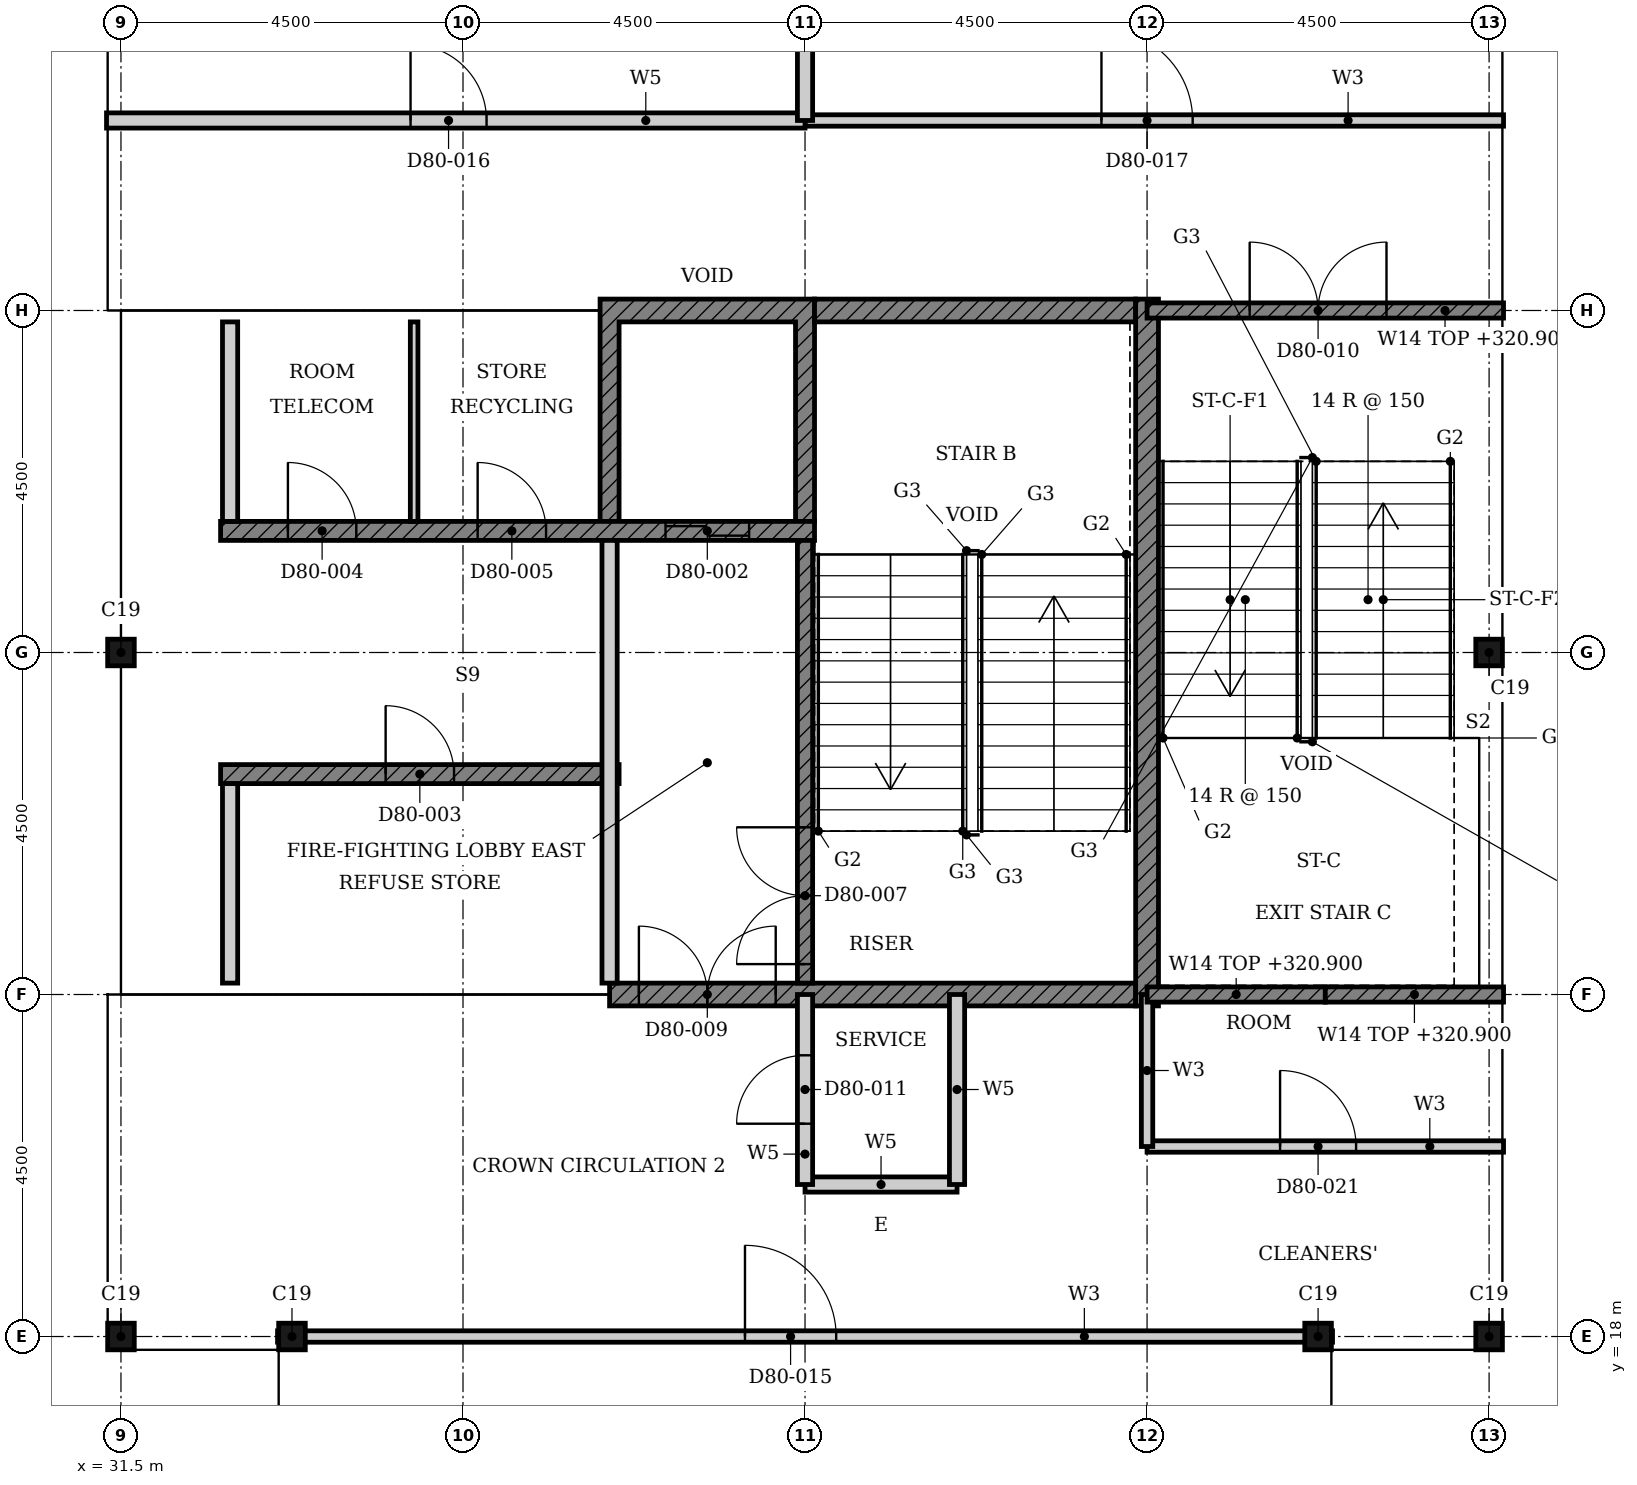
"""IFC4 building model, lengths in metres.
Left out: names, types, materials, properties, quantities, classifications, styles, units other than length and angle.
Written with IfcOpenShell. Run it as: python <this file> out.ifc"""

import sys

from ifc_helpers import new_model, si_unit, direction, frame, frame_2d, origin, origin_2d, place, context, subcontext, project, spatial, polyline, rectangle, i_section, outline, extrude, element, fill, save


model = new_model("IFC4")
c1 = context("Model", 3, precision=1e-05, world=origin(), true_north=direction((0.0, 1.0)))
c2 = subcontext(c1, "Body", "Model", "MODEL_VIEW")
j1 = project(units=[si_unit("LENGTHUNIT", "METRE"), si_unit("PLANEANGLEUNIT", "RADIAN")], contexts=[c1])
p1 = place(None, origin())
s1 = spatial("IfcSite", under=j1, at=p1, CompositionType="ELEMENT")
p2 = place(p1, origin())
s2 = spatial("IfcBuilding", under=s1, at=p2, CompositionType="ELEMENT")
p3 = place(p2, frame((0.0, 0.0, 317.0)))
s3 = spatial("IfcBuildingStorey", under=s2, at=p3, CompositionType="ELEMENT", Elevation=317.0)
for number, where, z_axis, x_axis in (
    (1, (47.25, 18.0, 0.0), (0.0, 0.0, 1.0), (1.0, 0.0, 0.0)),
    (2, (49.5, 18.0, 0.0), (0.0, 0.0, 1.0), (1.0, 0.0, 0.0)),
    (3, (49.5, 27.0, 0.0), (0.0, 0.0, 1.0), (1.0, 0.0, 0.0)),
    (4, (31.5, 27.0, 0.0), (0.0, 0.0, 1.0), (1.0, 0.0, 0.0)),
    (5, (31.5, 18.0, 0.0), (0.0, 0.0, 1.0), (1.0, 0.0, 0.0)),
    (6, (33.75, 18.0, 0.0), (0.0, 0.0, 1.0), (1.0, 0.0, 0.0)),
):
    element("IfcColumn", number, at=place(p3, frame(where, z_axis=z_axis, x_axis=x_axis)), inside=s3, PredefinedType="COLUMN", context=c2, shape_type="SweptSolid", body=[
        extrude(i_section(OverallWidth=0.35, OverallDepth=0.35, WebThickness=0.012, FlangeThickness=0.019, FilletRadius=0.013, at=origin_2d()), origin(), (0.0, 0.0, 1.0), 4.2),
    ])
p4 = place(p3, origin())
e7 = element("IfcWall", 7, at=p4, inside=s3, PredefinedType="SHEAR", context=c2, shape_type="SweptSolid", body=[
    extrude(outline(polyline([(37.803, 28.725), (38.053, 28.725), (38.053, 31.35), (40.375, 31.35), (40.375, 28.725), (40.625, 28.725), (40.625, 31.65), (37.803, 31.65), (37.803, 28.725)])), origin(), (0.0, 0.0, 1.0), 3.9),
])
p5 = place(p3, frame((37.928, 22.5, 0.0), z_axis=(0.0, 0.0, 1.0), x_axis=(1.0, 0.0, 0.0)))
e8 = element("IfcWall", 8, at=p5, inside=s3, PredefinedType="SHEAR", context=c2, shape_type="SweptSolid", body=[
    extrude(rectangle(XDim=6.922, YDim=0.3, at=frame_2d((3.461, 0.0))), origin(), (0.0, 0.0, 1.0), 3.1),
])
p6 = place(p5, frame((0.386, 0.0, 0.0)))
e9 = element("IfcOpeningElement", 9, at=p6, cuts=e8, PredefinedType="OPENING", context=c2, shape_type="SweptSolid", body=[
    extrude(rectangle(XDim=1.8, YDim=2.1, at=frame_2d((0.9, 1.05))), frame((0.0, 0.16, 0.0), z_axis=(0.0, -1.0, 0.0), x_axis=(1.0, 0.0, 0.0)), (0.0, 0.0, 1.0), 0.32),
])
p7 = place(p3, frame((40.625, 31.5, 0.0), z_axis=(0.0, 0.0, 1.0), x_axis=(1.0, 0.0, 0.0)))
e10 = element("IfcWall", 10, at=p7, inside=s3, PredefinedType="SHEAR", context=c2, shape_type="SweptSolid", body=[
    extrude(rectangle(XDim=4.225, YDim=0.3, at=frame_2d((2.113, 0.0))), origin(), (0.0, 0.0, 1.0), 3.1),
])
p8 = place(p3, frame((45.0, 22.35, 0.0), z_axis=(0.0, 0.0, 1.0), x_axis=(0.0, 1.0, 0.0)))
e11 = element("IfcWall", 11, at=p8, inside=s3, PredefinedType="SHEAR", context=c2, shape_type="SweptSolid", body=[
    extrude(rectangle(XDim=9.3, YDim=0.3, at=frame_2d((4.65, 0.0))), origin(), (0.0, 0.0, 1.0), 3.9),
])
p9 = place(p3, frame((32.811, 25.4, 0.0), z_axis=(0.0, 0.0, 1.0), x_axis=(1.0, 0.0, 0.0)))
e12 = element("IfcWall", 12, at=p9, inside=s3, PredefinedType="SHEAR", context=c2, shape_type="SweptSolid", body=[
    extrude(rectangle(XDim=5.243, YDim=0.25, at=frame_2d((2.621, 0.0))), origin(), (0.0, 0.0, 1.0), 3.9),
])
p10 = place(p9, frame((2.171, 0.0, 0.0)))
e13 = element("IfcOpeningElement", 13, at=p10, cuts=e12, PredefinedType="OPENING", context=c2, shape_type="SweptSolid", body=[
    extrude(rectangle(XDim=0.9, YDim=2.1, at=frame_2d((0.45, 1.05))), frame((0.0, 0.135, 0.0), z_axis=(0.0, -1.0, 0.0), x_axis=(1.0, 0.0, 0.0)), (0.0, 0.0, 1.0), 0.27),
])
p11 = place(p3, frame((32.811, 28.6, 0.0), z_axis=(0.0, 0.0, 1.0), x_axis=(1.0, 0.0, 0.0)))
e14 = element("IfcWall", 14, at=p11, inside=s3, PredefinedType="SHEAR", context=c2, shape_type="SweptSolid", body=[
    extrude(rectangle(XDim=7.814, YDim=0.25, at=frame_2d((3.907, 0.0))), origin(), (0.0, 0.0, 1.0), 3.9),
])
p12 = place(p11, frame((5.854, 0.0, 0.0)))
e15 = element("IfcOpeningElement", 15, at=p12, cuts=e14, PredefinedType="OPENING", context=c2, shape_type="SweptSolid", body=[
    extrude(rectangle(XDim=1.1, YDim=2.1, at=frame_2d((0.55, 1.05))), frame((0.0, 0.135, 0.0), z_axis=(0.0, -1.0, 0.0), x_axis=(1.0, 0.0, 0.0)), (0.0, 0.0, 1.0), 0.27),
])
p13 = place(p11, frame((0.886, 0.0, 0.0)))
e16 = element("IfcOpeningElement", 16, at=p13, cuts=e14, PredefinedType="OPENING", context=c2, shape_type="SweptSolid", body=[
    extrude(rectangle(XDim=0.9, YDim=2.1, at=frame_2d((0.45, 1.05))), frame((0.0, 0.135, 0.0), z_axis=(0.0, -1.0, 0.0), x_axis=(1.0, 0.0, 0.0)), (0.0, 0.0, 1.0), 0.27),
])
p14 = place(p11, frame((3.382, 0.0, 0.0)))
e17 = element("IfcOpeningElement", 17, at=p14, cuts=e14, PredefinedType="OPENING", context=c2, shape_type="SweptSolid", body=[
    extrude(rectangle(XDim=0.9, YDim=2.1, at=frame_2d((0.45, 1.05))), frame((0.0, 0.135, 0.0), z_axis=(0.0, -1.0, 0.0), x_axis=(1.0, 0.0, 0.0)), (0.0, 0.0, 1.0), 0.27),
])
for number, where, z_axis, x_axis in (
    (18, (32.936, 22.65, 0.0), (0.0, 0.0, 1.0), (0.0, 1.0, 0.0)),
    (19, (32.936, 28.725, 0.0), (0.0, 0.0, 1.0), (0.0, 1.0, 0.0)),
):
    element("IfcWall", number, at=place(p3, frame(where, z_axis=z_axis, x_axis=x_axis)), inside=s3, PredefinedType="PARTITIONING", context=c2, shape_type="SweptSolid", body=[
        extrude(rectangle(XDim=2.625, YDim=0.2, at=frame_2d((1.312, 0.0))), origin(), (0.0, 0.0, 1.0), 3.9),
    ])
p15 = place(p3, frame((35.357, 28.725, 0.0), z_axis=(0.0, 0.0, 1.0), x_axis=(0.0, 1.0, 0.0)))
e20 = element("IfcWall", 20, at=p15, inside=s3, PredefinedType="PARTITIONING", context=c2, shape_type="SweptSolid", body=[
    extrude(rectangle(XDim=2.625, YDim=0.1, at=frame_2d((1.312, 0.0))), origin(), (0.0, 0.0, 1.0), 3.9),
])
p16 = place(p3, frame((40.5, 22.65, 0.0), z_axis=(0.0, 0.0, 1.0), x_axis=(0.0, 1.0, 0.0)))
e21 = element("IfcWall", 21, at=p16, inside=s3, PredefinedType="SHEAR", context=c2, shape_type="SweptSolid", body=[
    extrude(rectangle(XDim=5.825, YDim=0.2, at=frame_2d((2.913, 0.0))), origin(), (0.0, 0.0, 1.0), 3.9),
])
p17 = place(p16, frame((0.25, 0.0, 0.0)))
e22 = element("IfcOpeningElement", 22, at=p17, cuts=e21, PredefinedType="OPENING", context=c2, shape_type="SweptSolid", body=[
    extrude(rectangle(XDim=1.8, YDim=2.1, at=frame_2d((0.9, 1.05))), frame((0.0, 0.11, 0.0), z_axis=(0.0, -1.0, 0.0), x_axis=(1.0, 0.0, 0.0)), (0.0, 0.0, 1.0), 0.22),
])
p18 = place(p3, frame((37.928, 22.65, 0.0), z_axis=(0.0, 0.0, 1.0), x_axis=(0.0, 1.0, 0.0)))
e23 = element("IfcWall", 23, at=p18, inside=s3, PredefinedType="PARTITIONING", context=c2, shape_type="SweptSolid", body=[
    extrude(rectangle(XDim=5.825, YDim=0.2, at=frame_2d((2.913, 0.0))), origin(), (0.0, 0.0, 1.0), 3.9),
])
p19 = place(p3, frame((33.56, 18.0, 0.0), z_axis=(0.0, 0.0, 1.0), x_axis=(1.0, 0.0, 0.0)))
e24 = element("IfcWall", 24, at=p19, inside=s3, PredefinedType="PARTITIONING", context=c2, shape_type="SweptSolid", body=[
    extrude(rectangle(XDim=13.88, YDim=0.15, at=frame_2d((6.94, 0.0))), origin(), (0.0, 0.0, 1.0), 3.08),
])
p20 = place(p19, frame((6.15, 0.0, 0.0)))
e25 = element("IfcOpeningElement", 25, at=p20, cuts=e24, PredefinedType="OPENING", context=c2, shape_type="SweptSolid", body=[
    extrude(rectangle(XDim=1.2, YDim=2.4, at=frame_2d((0.6, 1.2))), frame((0.0, 0.085, 0.0), z_axis=(0.0, -1.0, 0.0), x_axis=(1.0, 0.0, 0.0)), (0.0, 0.0, 1.0), 0.17),
])
p21 = place(p3, frame((45.0, 20.5, 0.0), z_axis=(0.0, 0.0, 1.0), x_axis=(1.0, 0.0, 0.0)))
e26 = element("IfcWall", 26, at=p21, inside=s3, PredefinedType="PARTITIONING", context=c2, shape_type="SweptSolid", body=[
    extrude(rectangle(XDim=4.69, YDim=0.15, at=frame_2d((2.345, 0.0))), origin(), (0.0, 0.0, 1.0), 3.9),
])
p22 = place(p21, frame((1.75, 0.0, 0.0)))
e27 = element("IfcOpeningElement", 27, at=p22, cuts=e26, PredefinedType="OPENING", context=c2, shape_type="SweptSolid", body=[
    extrude(rectangle(XDim=1.0, YDim=2.1, at=frame_2d((0.5, 1.05))), frame((0.0, 0.085, 0.0), z_axis=(0.0, -1.0, 0.0), x_axis=(1.0, 0.0, 0.0)), (0.0, 0.0, 1.0), 0.17),
])
p23 = place(p3, frame((40.5, 34.0, 0.0), z_axis=(0.0, 0.0, 1.0), x_axis=(1.0, 0.0, 0.0)))
e28 = element("IfcWall", 28, at=p23, inside=s3, PredefinedType="PARTITIONING", context=c2, shape_type="SweptSolid", body=[
    extrude(rectangle(XDim=9.19, YDim=0.15, at=frame_2d((4.595, 0.0))), origin(), (0.0, 0.0, 1.0), 3.9),
])
p24 = place(p23, frame((3.9, 0.0, 0.0)))
e29 = element("IfcOpeningElement", 29, at=p24, cuts=e28, PredefinedType="OPENING", context=c2, shape_type="SweptSolid", body=[
    extrude(rectangle(XDim=1.2, YDim=2.4, at=frame_2d((0.6, 1.2))), frame((0.0, 0.085, 0.0), z_axis=(0.0, -1.0, 0.0), x_axis=(1.0, 0.0, 0.0)), (0.0, 0.0, 1.0), 0.17),
])
p25 = place(p3, frame((45.0, 20.5, 0.0), z_axis=(0.0, 0.0, 1.0), x_axis=(0.0, 1.0, 0.0)))
e30 = element("IfcWall", 30, at=p25, inside=s3, PredefinedType="PARTITIONING", context=c2, shape_type="SweptSolid", body=[
    extrude(rectangle(XDim=2.0, YDim=0.15, at=frame_2d((1.0, 0.0))), origin(), (0.0, 0.0, 1.0), 3.9),
])
p26 = place(p3, frame((40.5, 20.0, 0.0), z_axis=(0.0, 0.0, 1.0), x_axis=(1.0, 0.0, 0.0)))
e31 = element("IfcWall", 31, at=p26, inside=s3, PredefinedType="PARTITIONING", context=c2, shape_type="SweptSolid", body=[
    extrude(rectangle(XDim=2.0, YDim=0.2, at=frame_2d((1.0, 0.0))), origin(), (0.0, 0.0, 1.0), 3.9),
])
p27 = place(p3, frame((31.31, 34.0, 0.0), z_axis=(0.0, 0.0, 1.0), x_axis=(1.0, 0.0, 0.0)))
e32 = element("IfcWall", 32, at=p27, inside=s3, PredefinedType="PARTITIONING", context=c2, shape_type="SweptSolid", body=[
    extrude(rectangle(XDim=9.19, YDim=0.2, at=frame_2d((4.595, 0.0))), origin(), (0.0, 0.0, 1.0), 3.9),
])
p28 = place(p27, frame((4.0, 0.0, 0.0)))
e33 = element("IfcOpeningElement", 33, at=p28, cuts=e32, PredefinedType="OPENING", context=c2, shape_type="SweptSolid", body=[
    extrude(rectangle(XDim=1.0, YDim=2.1, at=frame_2d((0.5, 1.05))), frame((0.0, 0.11, 0.0), z_axis=(0.0, -1.0, 0.0), x_axis=(1.0, 0.0, 0.0)), (0.0, 0.0, 1.0), 0.22),
])
p29 = place(p3, frame((40.5, 20.0, 0.0), z_axis=(0.0, 0.0, 1.0), x_axis=(0.0, 1.0, 0.0)))
e34 = element("IfcWall", 34, at=p29, inside=s3, PredefinedType="PARTITIONING", context=c2, shape_type="SweptSolid", body=[
    extrude(rectangle(XDim=2.5, YDim=0.2, at=frame_2d((1.25, 0.0))), origin(), (0.0, 0.0, 1.0), 3.9),
])
p30 = place(p29, frame((0.8, 0.0, 0.0)))
e35 = element("IfcOpeningElement", 35, at=p30, cuts=e34, PredefinedType="OPENING", context=c2, shape_type="SweptSolid", body=[
    extrude(rectangle(XDim=0.9, YDim=2.1, at=frame_2d((0.45, 1.05))), frame((0.0, 0.11, 0.0), z_axis=(0.0, -1.0, 0.0), x_axis=(1.0, 0.0, 0.0)), (0.0, 0.0, 1.0), 0.22),
])
p31 = place(p3, frame((40.5, 34.0, 0.0), z_axis=(0.0, 0.0, 1.0), x_axis=(0.0, 1.0, 0.0)))
e36 = element("IfcWall", 36, at=p31, inside=s3, PredefinedType="PARTITIONING", context=c2, shape_type="SweptSolid", body=[
    extrude(rectangle(XDim=6.69, YDim=0.2, at=frame_2d((3.345, 0.0))), origin(), (0.0, 0.0, 1.0), 3.9),
])
p32 = place(p3, frame((42.5, 20.0, 0.0), z_axis=(0.0, 0.0, 1.0), x_axis=(0.0, 1.0, 0.0)))
e37 = element("IfcWall", 37, at=p32, inside=s3, PredefinedType="PARTITIONING", context=c2, shape_type="SweptSolid", body=[
    extrude(rectangle(XDim=2.5, YDim=0.2, at=frame_2d((1.25, 0.0))), origin(), (0.0, 0.0, 1.0), 3.9),
])
p33 = place(p3, frame((45.0, 22.5, 0.0), z_axis=(0.0, 0.0, 1.0), x_axis=(1.0, 0.0, 0.0)))
e38 = element("IfcWall", 38, at=p33, inside=s3, PredefinedType="SHEAR", context=c2, shape_type="SweptSolid", body=[
    extrude(rectangle(XDim=2.345, YDim=0.2, at=frame_2d((1.172, 0.0))), origin(), (0.0, 0.0, 1.0), 3.9),
])
p34 = place(p3, frame((45.0, 31.5, 0.0), z_axis=(0.0, 0.0, 1.0), x_axis=(1.0, 0.0, 0.0)))
e39 = element("IfcWall", 39, at=p34, inside=s3, PredefinedType="SHEAR", context=c2, shape_type="SweptSolid", body=[
    extrude(rectangle(XDim=4.69, YDim=0.2, at=frame_2d((2.345, 0.0))), origin(), (0.0, 0.0, 1.0), 3.9),
])
p35 = place(p34, frame((1.35, 0.0, 0.0)))
e40 = element("IfcOpeningElement", 40, at=p35, cuts=e39, PredefinedType="OPENING", context=c2, shape_type="SweptSolid", body=[
    extrude(rectangle(XDim=1.8, YDim=2.1, at=frame_2d((0.9, 1.05))), frame((0.0, 0.11, 0.0), z_axis=(0.0, -1.0, 0.0), x_axis=(1.0, 0.0, 0.0)), (0.0, 0.0, 1.0), 0.22),
])
p36 = place(p3, frame((47.345, 22.5, 0.0), z_axis=(0.0, 0.0, 1.0), x_axis=(1.0, 0.0, 0.0)))
e41 = element("IfcWall", 41, at=p36, inside=s3, PredefinedType="SHEAR", context=c2, shape_type="SweptSolid", body=[
    extrude(rectangle(XDim=2.345, YDim=0.2, at=frame_2d((1.172, 0.0))), origin(), (0.0, 0.0, 1.0), 3.9),
])
p37 = place(p12, origin())
e42 = element("IfcDoor", 42, at=p37, inside=s3, OperationType="DOUBLE_DOOR_SLIDING", PredefinedType="DOOR", context=c2, shape_type="SweptSolid", body=[
    extrude(rectangle(XDim=1.1, YDim=2.1, at=frame_2d((0.55, 1.05))), frame((0.0, 0.025, 0.0), z_axis=(0.0, -1.0, 0.0), x_axis=(1.0, 0.0, 0.0)), (0.0, 0.0, 1.0), 0.05),
])
fill(e15, e42)
p38 = place(p10, origin())
e43 = element("IfcDoor", 43, at=p38, inside=s3, OperationType="SINGLE_SWING_LEFT", PredefinedType="DOOR", context=c2, shape_type="SweptSolid", body=[
    extrude(rectangle(XDim=0.9, YDim=2.1, at=frame_2d((0.45, 1.05))), frame((0.0, 0.025, 0.0), z_axis=(0.0, -1.0, 0.0), x_axis=(1.0, 0.0, 0.0)), (0.0, 0.0, 1.0), 0.05),
])
fill(e13, e43)
p39 = place(p13, origin())
e44 = element("IfcDoor", 44, at=p39, inside=s3, OperationType="SINGLE_SWING_LEFT", PredefinedType="DOOR", context=c2, shape_type="SweptSolid", body=[
    extrude(rectangle(XDim=0.9, YDim=2.1, at=frame_2d((0.45, 1.05))), frame((0.0, 0.025, 0.0), z_axis=(0.0, -1.0, 0.0), x_axis=(1.0, 0.0, 0.0)), (0.0, 0.0, 1.0), 0.05),
])
fill(e16, e44)
p40 = place(p14, origin())
e45 = element("IfcDoor", 45, at=p40, inside=s3, OperationType="SINGLE_SWING_LEFT", PredefinedType="DOOR", context=c2, shape_type="SweptSolid", body=[
    extrude(rectangle(XDim=0.9, YDim=2.1, at=frame_2d((0.45, 1.05))), frame((0.0, 0.025, 0.0), z_axis=(0.0, -1.0, 0.0), x_axis=(1.0, 0.0, 0.0)), (0.0, 0.0, 1.0), 0.05),
])
fill(e17, e45)
p41 = place(p17, origin())
e46 = element("IfcDoor", 46, at=p41, inside=s3, OperationType="DOUBLE_DOOR_SINGLE_SWING", PredefinedType="DOOR", context=c2, shape_type="SweptSolid", body=[
    extrude(rectangle(XDim=1.8, YDim=2.1, at=frame_2d((0.9, 1.05))), frame((0.0, 0.025, 0.0), z_axis=(0.0, -1.0, 0.0), x_axis=(1.0, 0.0, 0.0)), (0.0, 0.0, 1.0), 0.05),
])
fill(e22, e46)
p42 = place(p6, origin())
e47 = element("IfcDoor", 47, at=p42, inside=s3, OperationType="DOUBLE_DOOR_SINGLE_SWING", PredefinedType="DOOR", context=c2, shape_type="SweptSolid", body=[
    extrude(rectangle(XDim=1.8, YDim=2.1, at=frame_2d((0.9, 1.05))), frame((0.0, 0.025, 0.0), z_axis=(0.0, -1.0, 0.0), x_axis=(1.0, 0.0, 0.0)), (0.0, 0.0, 1.0), 0.05),
])
fill(e9, e47)
p43 = place(p35, origin())
e48 = element("IfcDoor", 48, at=p43, inside=s3, OperationType="DOUBLE_DOOR_SINGLE_SWING", PredefinedType="DOOR", context=c2, shape_type="SweptSolid", body=[
    extrude(rectangle(XDim=1.8, YDim=2.1, at=frame_2d((0.9, 1.05))), frame((0.0, 0.025, 0.0), z_axis=(0.0, -1.0, 0.0), x_axis=(1.0, 0.0, 0.0)), (0.0, 0.0, 1.0), 0.05),
])
fill(e40, e48)
p44 = place(p30, origin())
e49 = element("IfcDoor", 49, at=p44, inside=s3, OperationType="SINGLE_SWING_RIGHT", PredefinedType="DOOR", context=c2, shape_type="SweptSolid", body=[
    extrude(rectangle(XDim=0.9, YDim=2.1, at=frame_2d((0.45, 1.05))), frame((0.0, 0.025, 0.0), z_axis=(0.0, -1.0, 0.0), x_axis=(1.0, 0.0, 0.0)), (0.0, 0.0, 1.0), 0.05),
])
fill(e35, e49)
p45 = place(p20, origin())
e50 = element("IfcDoor", 50, at=p45, inside=s3, OperationType="SINGLE_SWING_RIGHT", PredefinedType="DOOR", context=c2, shape_type="SweptSolid", body=[
    extrude(rectangle(XDim=1.2, YDim=2.4, at=frame_2d((0.6, 1.2))), frame((0.0, 0.025, 0.0), z_axis=(0.0, -1.0, 0.0), x_axis=(1.0, 0.0, 0.0)), (0.0, 0.0, 1.0), 0.05),
])
fill(e25, e50)
p46 = place(p28, origin())
e51 = element("IfcDoor", 51, at=p46, inside=s3, OperationType="SINGLE_SWING_RIGHT", PredefinedType="DOOR", context=c2, shape_type="SweptSolid", body=[
    extrude(rectangle(XDim=1.0, YDim=2.1, at=frame_2d((0.5, 1.05))), frame((0.0, 0.025, 0.0), z_axis=(0.0, -1.0, 0.0), x_axis=(1.0, 0.0, 0.0)), (0.0, 0.0, 1.0), 0.05),
])
fill(e33, e51)
p47 = place(p24, origin())
e52 = element("IfcDoor", 52, at=p47, inside=s3, OperationType="SINGLE_SWING_RIGHT", PredefinedType="DOOR", context=c2, shape_type="SweptSolid", body=[
    extrude(rectangle(XDim=1.2, YDim=2.4, at=frame_2d((0.6, 1.2))), frame((0.0, 0.025, 0.0), z_axis=(0.0, -1.0, 0.0), x_axis=(1.0, 0.0, 0.0)), (0.0, 0.0, 1.0), 0.05),
])
fill(e29, e52)
p48 = place(p22, origin())
e53 = element("IfcDoor", 53, at=p48, inside=s3, OperationType="SINGLE_SWING_RIGHT", PredefinedType="DOOR", context=c2, shape_type="SweptSolid", body=[
    extrude(rectangle(XDim=1.0, YDim=2.1, at=frame_2d((0.5, 1.05))), frame((0.0, 0.025, 0.0), z_axis=(0.0, -1.0, 0.0), x_axis=(1.0, 0.0, 0.0)), (0.0, 0.0, 1.0), 0.05),
])
fill(e27, e53)
save(model, sys.argv[1])
